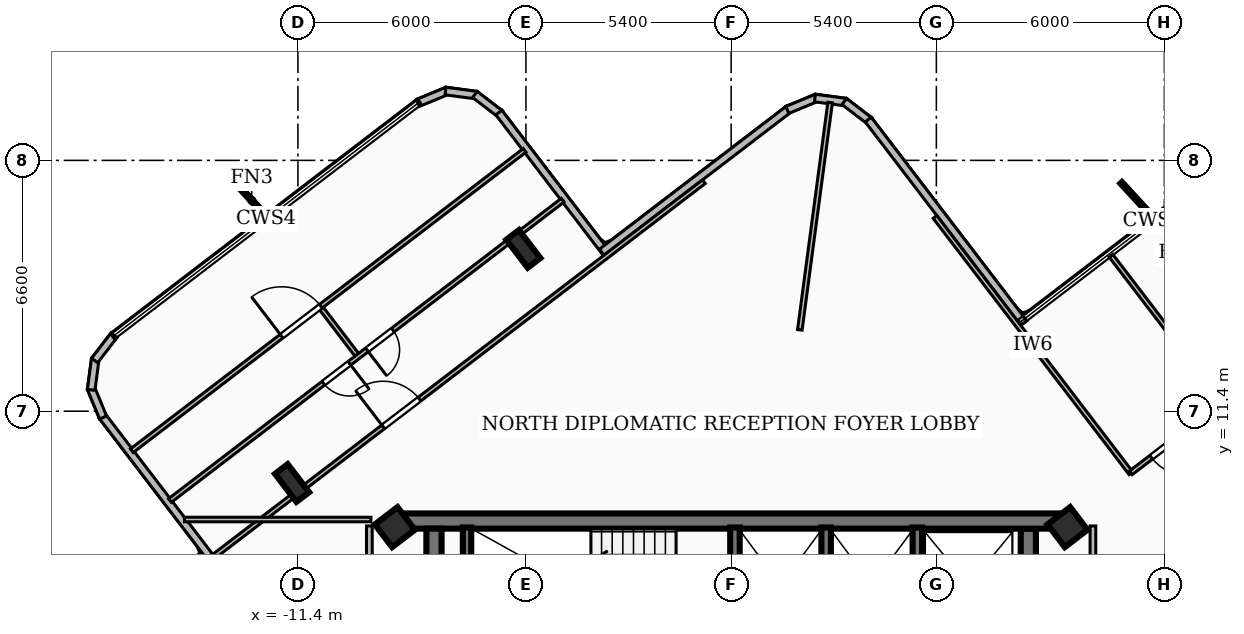
"""IFC4 building model, lengths in metres.
Left out: names, types, materials, properties, quantities, classifications, styles, units other than length and angle.
Written with IfcOpenShell. Run it as: python <this file> out.ifc"""

import sys

from ifc_helpers import new_model, si_unit, direction, frame, frame_2d, origin, origin_2d, place, context, subcontext, project, spatial, rectangle, i_section, extrude, element, fill, save


model = new_model("IFC4")
c1 = context("Model", 3, precision=1e-05, world=origin(), true_north=direction((0.0, 1.0)))
c2 = subcontext(c1, "Body", "Model", "MODEL_VIEW")
j1 = project(units=[si_unit("LENGTHUNIT", "METRE"), si_unit("PLANEANGLEUNIT", "RADIAN")], contexts=[c1])
p1 = place(None, origin())
s1 = spatial("IfcSite", under=j1, at=p1, CompositionType="ELEMENT")
p2 = place(p1, origin())
s2 = spatial("IfcBuilding", under=s1, at=p2, CompositionType="ELEMENT")
p3 = place(p2, frame((0.0, 0.0, 232.56)))
s3 = spatial("IfcBuildingStorey", under=s2, at=p3, CompositionType="ELEMENT", Elevation=232.56)
p4 = place(p3, frame((-8.78, 8.51, 0.0), z_axis=(0.0, 0.0, 1.0), x_axis=(1.0, 0.0, 0.0)))
e1 = element("IfcWall", 1, at=p4, inside=s3, PredefinedType="SHEAR", context=c2, shape_type="SweptSolid", body=[
    extrude(rectangle(XDim=17.56, YDim=0.4, at=frame_2d((8.78, 0.0))), origin(), (0.0, 0.0, 1.0), 3.14),
])
for number, where, z_axis, x_axis in (
    (2, (-7.82, 1.95, 0.0), (0.0, 0.0, 1.0), (0.0, 1.0, 0.0)),
    (3, (7.82, 8.31, 0.0), (0.0, 0.0, 1.0), (0.0, -1.0, 0.0)),
):
    element("IfcWall", number, at=place(p3, frame(where, z_axis=z_axis, x_axis=x_axis)), inside=s3, PredefinedType="SHEAR", context=c2, shape_type="SweptSolid", body=[
        extrude(rectangle(XDim=6.36, YDim=0.4, at=frame_2d((3.18, 0.0))), origin(), (0.0, 0.0, 1.0), 3.14),
    ])
p5 = place(p3, frame((-6.95, 5.28, 0.0), z_axis=(0.0, 0.0, 1.0), x_axis=(0.0, 1.0, 0.0)))
e4 = element("IfcWall", 4, at=p5, inside=s3, PredefinedType="SOLIDWALL", context=c2, shape_type="SweptSolid", body=[
    extrude(rectangle(XDim=3.06, YDim=0.22, at=frame_2d((1.53, 0.0))), origin(), (0.0, 0.0, 1.0), 3.14),
])
for number, where, z_axis, x_axis in (
    (5, (0.1, 5.3, 0.0), (0.0, 0.0, 1.0), (0.0, 1.0, 0.0)),
    (6, (2.5, 5.3, 0.0), (0.0, 0.0, 1.0), (0.0, 1.0, 0.0)),
    (7, (4.9, 5.3, 0.0), (0.0, 0.0, 1.0), (0.0, 1.0, 0.0)),
):
    element("IfcWall", number, at=place(p3, frame(where, z_axis=z_axis, x_axis=x_axis)), inside=s3, PredefinedType="SOLIDWALL", context=c2, shape_type="SweptSolid", body=[
        extrude(rectangle(XDim=3.04, YDim=0.25, at=frame_2d((1.52, 0.0))), origin(), (0.0, 0.0, 1.0), 3.14),
    ])
for number, where, z_axis, x_axis in (
    (8, (-8.85, 8.35, 0.0), (0.0, 0.0, 1.0), (0.794, 0.607, 0.0)),
    (9, (8.85, 8.35, 0.0), (0.0, 0.0, 1.0), (0.794, 0.607, 0.0)),
):
    element("IfcColumn", number, at=place(p3, frame(where, z_axis=z_axis, x_axis=x_axis)), inside=s3, PredefinedType="COLUMN", context=c2, shape_type="SweptSolid", body=[
        extrude(rectangle(XDim=0.75, YDim=0.75, at=origin_2d()), origin(), (0.0, 0.0, 1.0), 3.42),
    ])
for number, where, z_axis, x_axis in (
    (10, (-5.468, 15.671, 0.0), (0.0, 0.0, 1.0), (0.794, 0.607, 0.0)),
    (11, (-11.554, 9.51, 0.0), (0.0, 0.0, 1.0), (0.794, 0.607, 0.0)),
):
    element("IfcColumn", number, at=place(p3, frame(where, z_axis=z_axis, x_axis=x_axis)), inside=s3, PredefinedType="COLUMN", context=c2, shape_type="SweptSolid", body=[
        extrude(i_section(OverallWidth=0.418, OverallDepth=0.927, WebThickness=0.019, FlangeThickness=0.032, at=origin_2d()), origin(), (0.0, 0.0, 1.0), 3.42),
    ])
p6 = place(p3, frame((-19.074, 3.607, 0.0), z_axis=(0.0, 0.0, 1.0), x_axis=(0.794465731546, 0.607308983466, 0.0)))
e12 = element("IfcWall", 12, at=p6, inside=s3, PredefinedType="SOLIDWALL", context=c2, shape_type="SweptSolid", body=[
    extrude(rectangle(XDim=6.743, YDim=0.2, at=frame_2d((3.372, 0.0))), origin(), (0.0, 0.0, 1.0), 3.14),
])
p7 = place(p3, frame((-13.732, 7.589, 0.0), z_axis=(0.0, 0.0, 1.0), x_axis=(-0.607428636372, 0.794374251669, 0.0)))
e13 = element("IfcWall", 13, at=p7, inside=s3, PredefinedType="SOLIDWALL", context=c2, shape_type="SweptSolid", body=[
    extrude(rectangle(XDim=4.643, YDim=0.2, at=frame_2d((2.321, 0.0))), origin(), (0.0, 0.0, 1.0), 3.14),
])
p8 = place(p3, frame((-16.527, 11.234, 0.0), z_axis=(0.0, 0.0, 1.0), x_axis=(-0.381408676087, 0.924406524104, 0.0)))
e14 = element("IfcWall", 14, at=p8, inside=s3, PredefinedType="SOLIDWALL", context=c2, shape_type="SweptSolid", body=[
    extrude(rectangle(XDim=0.839, YDim=0.2, at=frame_2d((0.419, 0.0))), origin(), (0.0, 0.0, 1.0), 3.14),
])
p9 = place(p3, frame((-16.84, 11.961, 0.0), z_axis=(0.0, 0.0, 1.0), x_axis=(0.131059066172, 0.991374561492, 0.0)))
e15 = element("IfcWall", 15, at=p9, inside=s3, PredefinedType="SOLIDWALL", context=c2, shape_type="SweptSolid", body=[
    extrude(rectangle(XDim=0.825, YDim=0.2, at=frame_2d((0.413, 0.0))), origin(), (0.0, 0.0, 1.0), 3.14),
])
p10 = place(p3, frame((-16.75, 12.734, 0.0), z_axis=(0.0, 0.0, 1.0), x_axis=(0.609837482774, 0.792526494575, 0.0)))
e16 = element("IfcWall", 16, at=p10, inside=s3, PredefinedType="SOLIDWALL", context=c2, shape_type="SweptSolid", body=[
    extrude(rectangle(XDim=0.838, YDim=0.2, at=frame_2d((0.419, 0.0))), origin(), (0.0, 0.0, 1.0), 3.14),
])
p11 = place(p3, frame((-8.242, 19.511, 0.0), z_axis=(0.0, 0.0, 1.0), x_axis=(0.924091394431, 0.382171551451, 0.0)))
e17 = element("IfcWall", 17, at=p11, inside=s3, PredefinedType="SOLIDWALL", context=c2, shape_type="SweptSolid", body=[
    extrude(rectangle(XDim=0.837, YDim=0.2, at=frame_2d((0.419, 0.0))), origin(), (0.0, 0.0, 1.0), 3.14),
])
p12 = place(p3, frame((-7.516, 19.824, 0.0), z_axis=(0.0, 0.0, 1.0), x_axis=(0.991412958994, -0.130768286444, 0.0)))
e18 = element("IfcWall", 18, at=p12, inside=s3, PredefinedType="SOLIDWALL", context=c2, shape_type="SweptSolid", body=[
    extrude(rectangle(XDim=0.825, YDim=0.2, at=frame_2d((0.413, 0.0))), origin(), (0.0, 0.0, 1.0), 3.14),
])
p13 = place(p3, frame((-6.743, 19.734, 0.0), z_axis=(0.0, 0.0, 1.0), x_axis=(0.792959338773, -0.609274558022, 0.0)))
e19 = element("IfcWall", 19, at=p13, inside=s3, PredefinedType="SOLIDWALL", context=c2, shape_type="SweptSolid", body=[
    extrude(rectangle(XDim=0.839, YDim=0.2, at=frame_2d((0.419, 0.0))), origin(), (0.0, 0.0, 1.0), 3.14),
])
p14 = place(p3, frame((-6.113, 19.258, 0.0), z_axis=(0.0, 0.0, 1.0), x_axis=(0.607327150699, -0.794451843741, 0.0)))
e20 = element("IfcWall", 20, at=p14, inside=s3, PredefinedType="SOLIDWALL", context=c2, shape_type="SweptSolid", body=[
    extrude(rectangle(XDim=4.643, YDim=0.2, at=frame_2d((2.322, 0.0))), origin(), (0.0, 0.0, 1.0), 3.14),
])
p15 = place(p3, frame((-3.406, 15.584, 0.0), z_axis=(0.0, 0.0, 1.0), x_axis=(0.794329901805, 0.60748663121, 0.0)))
e21 = element("IfcWall", 21, at=p15, inside=s3, PredefinedType="SOLIDWALL", context=c2, shape_type="SweptSolid", body=[
    extrude(rectangle(XDim=6.203, YDim=0.2, at=frame_2d((3.101, 0.0))), origin(), (0.0, 0.0, 1.0), 3.14),
])
p16 = place(p3, frame((1.478, 19.327, 0.0), z_axis=(0.0, 0.0, 1.0), x_axis=(0.924091394431, 0.382171551451, 0.0)))
e22 = element("IfcWall", 22, at=p16, inside=s3, PredefinedType="SOLIDWALL", context=c2, shape_type="SweptSolid", body=[
    extrude(rectangle(XDim=0.837, YDim=0.2, at=frame_2d((0.419, 0.0))), origin(), (0.0, 0.0, 1.0), 3.14),
])
p17 = place(p3, frame((2.204, 19.64, 0.0), z_axis=(0.0, 0.0, 1.0), x_axis=(0.99140789753, -0.130806653943, 0.0)))
e23 = element("IfcWall", 23, at=p17, inside=s3, PredefinedType="SOLIDWALL", context=c2, shape_type="SweptSolid", body=[
    extrude(rectangle(XDim=0.825, YDim=0.2, at=frame_2d((0.413, 0.0))), origin(), (0.0, 0.0, 1.0), 3.14),
])
p18 = place(p3, frame((2.977, 19.55, 0.0), z_axis=(0.0, 0.0, 1.0), x_axis=(0.792959338773, -0.609274558022, 0.0)))
e24 = element("IfcWall", 24, at=p18, inside=s3, PredefinedType="SOLIDWALL", context=c2, shape_type="SweptSolid", body=[
    extrude(rectangle(XDim=0.839, YDim=0.2, at=frame_2d((0.419, 0.0))), origin(), (0.0, 0.0, 1.0), 3.14),
])
p19 = place(p3, frame((3.607, 19.074, 0.0), z_axis=(0.0, 0.0, 1.0), x_axis=(0.607308983466, -0.794465731546, 0.0)))
e25 = element("IfcWall", 25, at=p19, inside=s3, PredefinedType="SOLIDWALL", context=c2, shape_type="SweptSolid", body=[
    extrude(rectangle(XDim=6.743, YDim=0.2, at=frame_2d((3.372, 0.0))), origin(), (0.0, 0.0, 1.0), 3.14),
])
p20 = place(p3, frame((-9.52, 1.75, 0.0), z_axis=(0.0, 0.0, 1.0), x_axis=(0.0, 1.0, 0.0)))
e26 = element("IfcWall", 26, at=p20, inside=s3, PredefinedType="PARTITIONING", context=c2, shape_type="SweptSolid", body=[
    extrude(rectangle(XDim=6.63, YDim=0.15, at=frame_2d((3.315, 0.0))), origin(), (0.0, 0.0, 1.0), 3.14),
])
p21 = place(p3, frame((9.52, 1.75, 0.0), z_axis=(0.0, 0.0, 1.0), x_axis=(0.0, 1.0, 0.0)))
e27 = element("IfcWall", 27, at=p21, inside=s3, PredefinedType="PARTITIONING", context=c2, shape_type="SweptSolid", body=[
    extrude(rectangle(XDim=6.63, YDim=0.15, at=frame_2d((3.315, 0.0))), origin(), (0.0, 0.0, 1.0), 2.51),
])
p22 = place(p3, frame((-14.386, 8.55, 0.0), z_axis=(0.0, 0.0, 1.0), x_axis=(1.0, 0.0, 0.0)))
e28 = element("IfcWall", 28, at=p22, inside=s3, PredefinedType="PARTITIONING", context=c2, shape_type="SweptSolid", body=[
    extrude(rectangle(XDim=4.906, YDim=0.12, at=frame_2d((2.453, 0.0))), origin(), (0.0, 0.0, 1.0), 2.51),
])
p23 = place(p3, frame((1.807, 13.54, 0.0), z_axis=(0.0, 0.0, 1.0), x_axis=(0.132245865303, 0.991216944523, 0.0)))
e29 = element("IfcWall", 29, at=p23, inside=s3, PredefinedType="PARTITIONING", context=c2, shape_type="SweptSolid", body=[
    extrude(rectangle(XDim=6.035, YDim=0.12, at=frame_2d((3.018, 0.0))), origin(), (0.0, 0.0, 1.0), 3.14),
])
p24 = place(p3, frame((10.52, 9.768, 0.0), z_axis=(0.0, 0.0, 1.0), x_axis=(-0.607441568234, 0.794364362985, 0.0)))
e30 = element("IfcWall", 30, at=p24, inside=s3, PredefinedType="PARTITIONING", context=c2, shape_type="SweptSolid", body=[
    extrude(rectangle(XDim=8.49, YDim=0.12, at=frame_2d((4.245, 0.0))), origin(), (0.0, 0.0, 1.0), 2.51),
])
p25 = place(p3, frame((12.945, 11.634, 0.0), z_axis=(0.0, 0.0, 1.0), x_axis=(-0.794509541066, -0.607251668714, 0.0)))
e31 = element("IfcWall", 31, at=p25, inside=s3, PredefinedType="PARTITIONING", context=c2, shape_type="SweptSolid", body=[
    extrude(rectangle(XDim=3.06, YDim=0.12, at=frame_2d((1.53, 0.0))), origin(), (0.0, 0.0, 1.0), 2.51),
])
p26 = place(p25, frame((1.08, 0.0, 0.0)))
e32 = element("IfcOpeningElement", 32, at=p26, cuts=e31, PredefinedType="OPENING", context=c2, shape_type="SweptSolid", body=[
    extrude(rectangle(XDim=1.3, YDim=2.1, at=frame_2d((0.65, 1.05))), frame((0.0, 0.07, 0.0), z_axis=(0.0, -1.0, 0.0), x_axis=(1.0, 0.0, 0.0)), (0.0, 0.0, 1.0), 0.14),
])
p27 = place(p3, frame((9.996, 15.491, 0.0), z_axis=(0.0, 0.0, 1.0), x_axis=(0.607384628916, -0.794407900613, 0.0)))
e33 = element("IfcWall", 33, at=p27, inside=s3, PredefinedType="PARTITIONING", context=c2, shape_type="SweptSolid", body=[
    extrude(rectangle(XDim=13.01, YDim=0.12, at=frame_2d((6.505, 0.0))), origin(), (0.0, 0.0, 1.0), 2.51),
])
p28 = place(p27, frame((6.655, 0.0, 0.0)))
e34 = element("IfcOpeningElement", 34, at=p28, cuts=e33, PredefinedType="OPENING", context=c2, shape_type="SweptSolid", body=[
    extrude(rectangle(XDim=0.86, YDim=2.04, at=frame_2d((0.43, 1.02))), frame((0.0, 0.07, 0.0), z_axis=(0.0, -1.0, 0.0), x_axis=(1.0, 0.0, 0.0)), (0.0, 0.0, 1.0), 0.14),
])
p29 = place(p27, frame((5.455, 0.0, 0.0)))
e35 = element("IfcOpeningElement", 35, at=p29, cuts=e33, PredefinedType="OPENING", context=c2, shape_type="SweptSolid", body=[
    extrude(rectangle(XDim=0.86, YDim=2.04, at=frame_2d((0.43, 1.02))), frame((0.0, 0.07, 0.0), z_axis=(0.0, -1.0, 0.0), x_axis=(1.0, 0.0, 0.0)), (0.0, 0.0, 1.0), 0.14),
])
p30 = place(p3, frame((-17.068, 4.939, 0.0), z_axis=(0.0, 0.0, 1.0), x_axis=(0.794433927634, 0.607350586255, 0.0)))
e36 = element("IfcWall", 36, at=p30, inside=s3, PredefinedType="PARTITIONING", context=c2, shape_type="SweptSolid", body=[
    extrude(rectangle(XDim=20.58, YDim=0.12, at=frame_2d((10.29, 0.0))), origin(), (0.0, 0.0, 1.0), 2.51),
])
p31 = place(p30, frame((9.96, 0.0, 0.0)))
e37 = element("IfcOpeningElement", 37, at=p31, cuts=e36, PredefinedType="OPENING", context=c2, shape_type="SweptSolid", body=[
    extrude(rectangle(XDim=1.2, YDim=2.1, at=frame_2d((0.6, 1.05))), frame((0.0, 0.07, 0.0), z_axis=(0.0, -1.0, 0.0), x_axis=(1.0, 0.0, 0.0)), (0.0, 0.0, 1.0), 0.14),
])
p32 = place(p3, frame((-9.852, 12.885, 0.0), z_axis=(0.0, 0.0, 1.0), x_axis=(-0.607047349334, 0.794665662821, 0.0)))
e38 = element("IfcWall", 38, at=p32, inside=s3, PredefinedType="PARTITIONING", context=c2, shape_type="SweptSolid", body=[
    extrude(rectangle(XDim=1.53, YDim=0.12, at=frame_2d((0.765, 0.0))), origin(), (0.0, 0.0, 1.0), 3.14),
])
p33 = place(p3, frame((-4.433, 16.952, 0.0), z_axis=(0.0, 0.0, 1.0), x_axis=(-0.794407900613, -0.607384628916, 0.0)))
e39 = element("IfcWall", 39, at=p33, inside=s3, PredefinedType="PARTITIONING", context=c2, shape_type="SweptSolid", body=[
    extrude(rectangle(XDim=13.01, YDim=0.12, at=frame_2d((6.505, 0.0))), origin(), (0.0, 0.0, 1.0), 3.14),
])
p34 = place(p33, frame((5.625, 0.0, 0.0)))
e40 = element("IfcOpeningElement", 40, at=p34, cuts=e39, PredefinedType="OPENING", context=c2, shape_type="SweptSolid", body=[
    extrude(rectangle(XDim=0.86, YDim=2.04, at=frame_2d((0.43, 1.02))), frame((0.0, 0.07, 0.0), z_axis=(0.0, -1.0, 0.0), x_axis=(1.0, 0.0, 0.0)), (0.0, 0.0, 1.0), 0.14),
])
p35 = place(p33, frame((7.065, 0.0, 0.0)))
e41 = element("IfcOpeningElement", 41, at=p35, cuts=e39, PredefinedType="OPENING", context=c2, shape_type="SweptSolid", body=[
    extrude(rectangle(XDim=0.86, YDim=2.04, at=frame_2d((0.43, 1.02))), frame((0.0, 0.07, 0.0), z_axis=(0.0, -1.0, 0.0), x_axis=(1.0, 0.0, 0.0)), (0.0, 0.0, 1.0), 0.14),
])
p36 = place(p3, frame((-15.77, 10.361, 0.0), z_axis=(0.0, 0.0, 1.0), x_axis=(0.794407900613, 0.607384628916, 0.0)))
e42 = element("IfcWall", 42, at=p36, inside=s3, PredefinedType="PARTITIONING", context=c2, shape_type="SweptSolid", body=[
    extrude(rectangle(XDim=13.01, YDim=0.12, at=frame_2d((6.505, 0.0))), origin(), (0.0, 0.0, 1.0), 3.14),
])
p37 = place(p36, frame((4.96, 0.0, 0.0)))
e43 = element("IfcOpeningElement", 43, at=p37, cuts=e42, PredefinedType="OPENING", context=c2, shape_type="SweptSolid", body=[
    extrude(rectangle(XDim=1.3, YDim=2.1, at=frame_2d((0.65, 1.05))), frame((0.0, 0.07, 0.0), z_axis=(0.0, -1.0, 0.0), x_axis=(1.0, 0.0, 0.0)), (0.0, 0.0, 1.0), 0.14),
])
p38 = place(p26, origin())
e44 = element("IfcDoor", 44, at=p38, inside=s3, OperationType="SINGLE_SWING_LEFT", PredefinedType="DOOR", context=c2, shape_type="SweptSolid", body=[
    extrude(rectangle(XDim=1.3, YDim=2.1, at=frame_2d((0.65, 1.05))), frame((0.0, 0.025, 0.0), z_axis=(0.0, -1.0, 0.0), x_axis=(1.0, 0.0, 0.0)), (0.0, 0.0, 1.0), 0.05),
])
fill(e32, e44)
p39 = place(p31, origin())
e45 = element("IfcDoor", 45, at=p39, inside=s3, OperationType="SINGLE_SWING_LEFT", PredefinedType="DOOR", context=c2, shape_type="SweptSolid", body=[
    extrude(rectangle(XDim=1.2, YDim=2.1, at=frame_2d((0.6, 1.05))), frame((0.0, 0.025, 0.0), z_axis=(0.0, -1.0, 0.0), x_axis=(1.0, 0.0, 0.0)), (0.0, 0.0, 1.0), 0.05),
])
fill(e37, e45)
p40 = place(p34, origin())
e46 = element("IfcDoor", 46, at=p40, inside=s3, OperationType="SINGLE_SWING_RIGHT", PredefinedType="DOOR", context=c2, shape_type="SweptSolid", body=[
    extrude(rectangle(XDim=0.86, YDim=2.04, at=frame_2d((0.43, 1.02))), frame((0.0, 0.025, 0.0), z_axis=(0.0, -1.0, 0.0), x_axis=(1.0, 0.0, 0.0)), (0.0, 0.0, 1.0), 0.05),
])
fill(e40, e46)
p41 = place(p35, origin())
e47 = element("IfcDoor", 47, at=p41, inside=s3, OperationType="SINGLE_SWING_LEFT", PredefinedType="DOOR", context=c2, shape_type="SweptSolid", body=[
    extrude(rectangle(XDim=0.86, YDim=2.04, at=frame_2d((0.43, 1.02))), frame((0.0, 0.025, 0.0), z_axis=(0.0, -1.0, 0.0), x_axis=(1.0, 0.0, 0.0)), (0.0, 0.0, 1.0), 0.05),
])
fill(e41, e47)
p42 = place(p37, origin())
e48 = element("IfcDoor", 48, at=p42, inside=s3, OperationType="SINGLE_SWING_LEFT", PredefinedType="DOOR", context=c2, shape_type="SweptSolid", body=[
    extrude(rectangle(XDim=1.3, YDim=2.1, at=frame_2d((0.65, 1.05))), frame((0.0, 0.025, 0.0), z_axis=(0.0, -1.0, 0.0), x_axis=(1.0, 0.0, 0.0)), (0.0, 0.0, 1.0), 0.05),
])
fill(e43, e48)
save(model, sys.argv[1])
